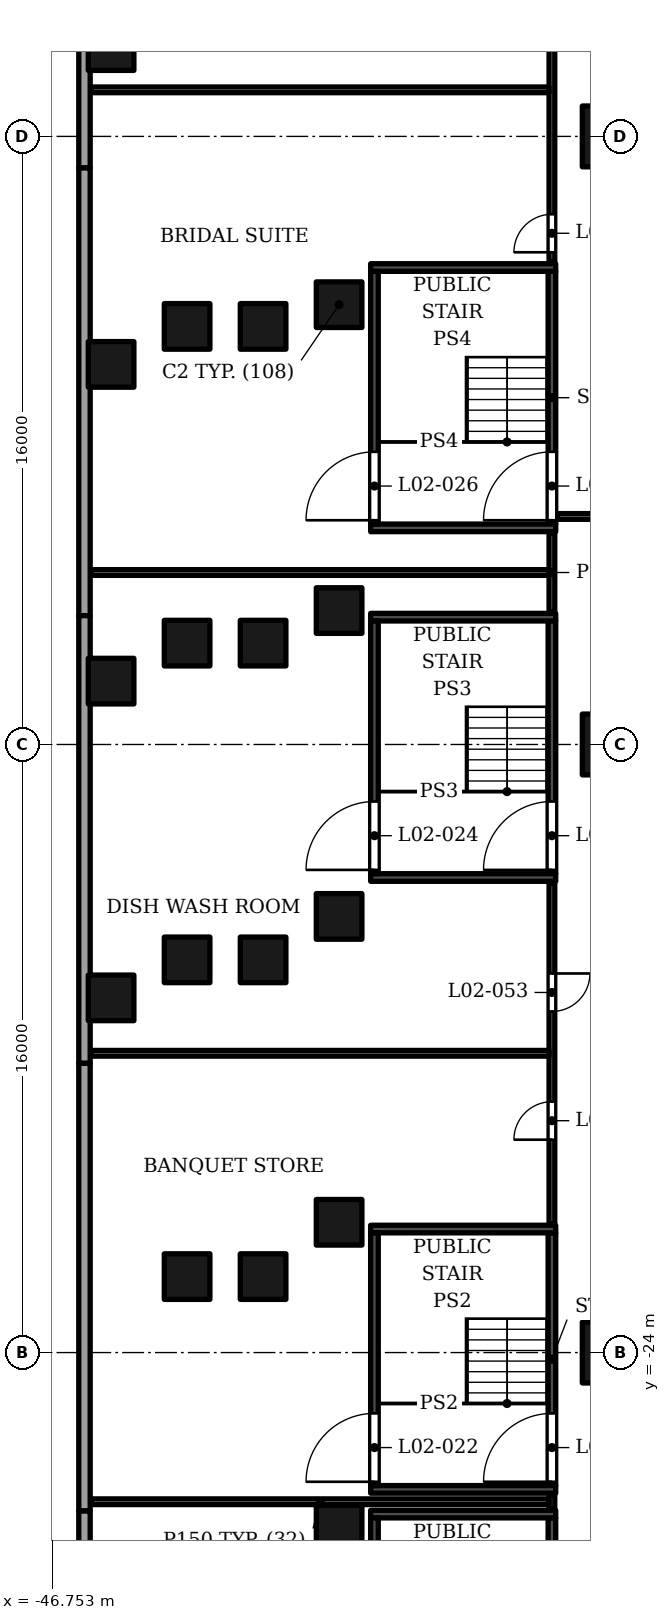
"""IFC4 building model, lengths in metres.
Left out: names, types, materials, properties, quantities, classifications, styles, units other than length and angle.
Written with IfcOpenShell. Run it as: python <this file> out.ifc"""

import sys

from ifc_helpers import new_model, si_unit, direction, frame, frame_2d, origin, origin_2d, place, context, subcontext, project, spatial, rectangle, extrude, element, fill, save


model = new_model("IFC4")
c1 = context("Model", 3, precision=1e-05, world=origin(), true_north=direction((0.0, 1.0)))
c2 = subcontext(c1, "Body", "Model", "MODEL_VIEW")
j1 = project(units=[si_unit("LENGTHUNIT", "METRE"), si_unit("PLANEANGLEUNIT", "RADIAN")], contexts=[c1])
p1 = place(None, origin())
s1 = spatial("IfcSite", under=j1, at=p1, CompositionType="ELEMENT")
p2 = place(p1, origin())
s2 = spatial("IfcBuilding", under=s1, at=p2, CompositionType="ELEMENT")
p3 = place(p2, frame((0.0, 0.0, 20.0)))
s3 = spatial("IfcBuildingStorey", under=s2, at=p3, CompositionType="ELEMENT", Elevation=20.0)
for number, where, z_axis, x_axis in (
    (1, (-32.0, -24.0, 0.0), (0.0, 0.0, 1.0), (1.0, 0.0, 0.0)),
    (2, (-32.0, -8.0, 0.0), (0.0, 0.0, 1.0), (1.0, 0.0, 0.0)),
    (3, (-32.0, 8.0, 0.0), (0.0, 0.0, 1.0), (1.0, 0.0, 0.0)),
):
    element("IfcColumn", number, at=place(p3, frame(where, z_axis=z_axis, x_axis=x_axis)), inside=s3, PredefinedType="COLUMN", context=c2, shape_type="SweptSolid", body=[
        extrude(rectangle(XDim=1.6, YDim=1.6, at=origin_2d()), origin(), (0.0, 0.0, 1.0), 9.0),
    ])
for number, where, z_axis, x_axis in (
    (4, (-39.2, -28.62, 0.0), (0.0, 0.0, 1.0), (1.0, 0.0, 0.0)),
    (5, (-39.2, -20.572, 0.0), (0.0, 0.0, 1.0), (1.0, 0.0, 0.0)),
    (6, (-39.2, -12.524, 0.0), (0.0, 0.0, 1.0), (1.0, 0.0, 0.0)),
    (7, (-39.2, -4.476, 0.0), (0.0, 0.0, 1.0), (1.0, 0.0, 0.0)),
    (8, (-39.2, 3.572, 0.0), (0.0, 0.0, 1.0), (1.0, 0.0, 0.0)),
    (9, (-41.2, -22.001, 0.0), (0.0, 0.0, 1.0), (1.0, 0.0, 0.0)),
    (10, (-41.2, -13.667, 0.0), (0.0, 0.0, 1.0), (1.0, 0.0, 0.0)),
    (11, (-41.2, -5.333, 0.0), (0.0, 0.0, 1.0), (1.0, 0.0, 0.0)),
    (12, (-41.2, 3.001, 0.0), (0.0, 0.0, 1.0), (1.0, 0.0, 0.0)),
    (13, (-43.2, -22.001, 0.0), (0.0, 0.0, 1.0), (1.0, 0.0, 0.0)),
    (14, (-43.2, -13.667, 0.0), (0.0, 0.0, 1.0), (1.0, 0.0, 0.0)),
    (15, (-43.2, -5.333, 0.0), (0.0, 0.0, 1.0), (1.0, 0.0, 0.0)),
    (16, (-43.2, 3.001, 0.0), (0.0, 0.0, 1.0), (1.0, 0.0, 0.0)),
    (17, (-45.2, -14.667, 0.0), (0.0, 0.0, 1.0), (1.0, 0.0, 0.0)),
    (18, (-45.2, -6.333, 0.0), (0.0, 0.0, 1.0), (1.0, 0.0, 0.0)),
    (19, (-45.2, 2.001, 0.0), (0.0, 0.0, 1.0), (1.0, 0.0, 0.0)),
    (20, (-45.2, 10.337, 0.0), (0.0, 0.0, 1.0), (1.0, 0.0, 0.0)),
):
    element("IfcColumn", number, at=place(p3, frame(where, z_axis=z_axis, x_axis=x_axis)), inside=s3, PredefinedType="COLUMN", context=c2, shape_type="SweptSolid", body=[
        extrude(rectangle(XDim=1.2, YDim=1.2, at=origin_2d()), origin(), (0.0, 0.0, 1.0), 9.0),
    ])
for number, where, z_axis, x_axis in (
    (21, (-45.9, 18.95, 0.0), (0.0, 0.0, 1.0), (0.0, -1.0, 0.0)),
    (22, (-45.9, 7.17, 0.0), (0.0, 0.0, 1.0), (0.0, -1.0, 0.0)),
):
    element("IfcWall", number, at=place(p3, frame(where, z_axis=z_axis, x_axis=x_axis)), inside=s3, PredefinedType="SOLIDWALL", context=c2, shape_type="SweptSolid", body=[
        extrude(rectangle(XDim=11.78, YDim=0.3, at=frame_2d((5.89, 0.0))), origin(), (0.0, 0.0, 1.0), 7.6),
    ])
p4 = place(p3, frame((-45.9, -4.61, 0.0), z_axis=(0.0, 0.0, 1.0), x_axis=(0.0, -1.0, 0.0)))
e23 = element("IfcWall", 23, at=p4, inside=s3, PredefinedType="SOLIDWALL", context=c2, shape_type="SweptSolid", body=[
    extrude(rectangle(XDim=11.78, YDim=0.3, at=frame_2d((5.89, 0.0))), origin(), (0.0, 0.0, 1.0), 7.6),
])
for number, where, z_axis, x_axis in (
    (24, (-45.9, -16.39, 0.0), (0.0, 0.0, 1.0), (0.0, -1.0, 0.0)),
    (25, (-45.9, -28.17, 0.0), (0.0, 0.0, 1.0), (0.0, -1.0, 0.0)),
):
    element("IfcWall", number, at=place(p3, frame(where, z_axis=z_axis, x_axis=x_axis)), inside=s3, PredefinedType="SOLIDWALL", context=c2, shape_type="SweptSolid", body=[
        extrude(rectangle(XDim=11.78, YDim=0.3, at=frame_2d((5.89, 0.0))), origin(), (0.0, 0.0, 1.0), 7.6),
    ])
for number, where, z_axis, x_axis in (
    (26, (-45.85, 18.79, 9.0), (0.0, 0.0, 1.0), (0.0, -1.0, 0.0)),
    (27, (-45.85, 4.093, 9.0), (0.0, 0.0, 1.0), (0.0, -1.0, 0.0)),
    (28, (-45.85, -10.605, 9.0), (0.0, 0.0, 1.0), (0.0, -1.0, 0.0)),
    (29, (-45.85, -25.302, 9.0), (0.0, 0.0, 1.0), (0.0, -1.0, 0.0)),
):
    element("IfcWall", number, at=place(p3, frame(where, z_axis=z_axis, x_axis=x_axis)), inside=s3, PredefinedType="PARAPET", context=c2, shape_type="SweptSolid", body=[
        extrude(rectangle(XDim=14.698, YDim=0.3, at=frame_2d((7.349, 0.0))), origin(), (0.0, 0.0, 1.0), 1.1),
    ])
p5 = place(p3, frame((-38.37, -28.25, 0.0), z_axis=(0.0, 0.0, 1.0), x_axis=(1.0, 0.0, 0.0)))
e30 = element("IfcWall", 30, at=p5, inside=s3, PredefinedType="SOLIDWALL", context=c2, shape_type="SweptSolid", body=[
    extrude(rectangle(XDim=4.87, YDim=0.2, at=frame_2d((2.435, 0.0))), origin(), (0.0, 0.0, 1.0), 8.55),
])
p6 = place(p3, frame((-38.27, -35.0, 0.0), z_axis=(0.0, 0.0, 1.0), x_axis=(0.0, 1.0, 0.0)))
e31 = element("IfcWall", 31, at=p6, inside=s3, PredefinedType="SOLIDWALL", context=c2, shape_type="SweptSolid", body=[
    extrude(rectangle(XDim=6.65, YDim=0.2, at=frame_2d((3.325, 0.0))), origin(), (0.0, 0.0, 1.0), 8.55),
])
p7 = place(p6, frame((0.1, 0.0, 0.0)))
e32 = element("IfcOpeningElement", 32, at=p7, cuts=e31, PredefinedType="OPENING", context=c2, shape_type="SweptSolid", body=[
    extrude(rectangle(XDim=1.8, YDim=2.4, at=frame_2d((0.9, 1.2))), frame((0.0, 0.11, 0.0), z_axis=(0.0, -1.0, 0.0), x_axis=(1.0, 0.0, 0.0)), (0.0, 0.0, 1.0), 0.22),
])
p8 = place(p3, frame((-33.6, -35.0, 0.0), z_axis=(0.0, 0.0, 1.0), x_axis=(0.0, 1.0, 0.0)))
e33 = element("IfcWall", 33, at=p8, inside=s3, PredefinedType="SOLIDWALL", context=c2, shape_type="SweptSolid", body=[
    extrude(rectangle(XDim=6.65, YDim=0.2, at=frame_2d((3.325, 0.0))), origin(), (0.0, 0.0, 1.0), 8.55),
])
p9 = place(p8, frame((0.1, 0.0, 0.0)))
e34 = element("IfcOpeningElement", 34, at=p9, cuts=e33, PredefinedType="OPENING", context=c2, shape_type="SweptSolid", body=[
    extrude(rectangle(XDim=1.8, YDim=2.4, at=frame_2d((0.9, 1.2))), frame((0.0, 0.11, 0.0), z_axis=(0.0, -1.0, 0.0), x_axis=(1.0, 0.0, 0.0)), (0.0, 0.0, 1.0), 0.22),
])
for number, where, z_axis, x_axis in (
    (35, (-38.37, -27.6, 0.0), (0.0, 0.0, 1.0), (1.0, 0.0, 0.0)),
    (36, (-38.37, -20.75, 0.0), (0.0, 0.0, 1.0), (1.0, 0.0, 0.0)),
):
    element("IfcWall", number, at=place(p3, frame(where, z_axis=z_axis, x_axis=x_axis)), inside=s3, PredefinedType="SOLIDWALL", context=c2, shape_type="SweptSolid", body=[
        extrude(rectangle(XDim=4.87, YDim=0.2, at=frame_2d((2.435, 0.0))), origin(), (0.0, 0.0, 1.0), 8.55),
    ])
p10 = place(p3, frame((-38.27, -27.5, 0.0), z_axis=(0.0, 0.0, 1.0), x_axis=(0.0, 1.0, 0.0)))
e37 = element("IfcWall", 37, at=p10, inside=s3, PredefinedType="SOLIDWALL", context=c2, shape_type="SweptSolid", body=[
    extrude(rectangle(XDim=6.65, YDim=0.2, at=frame_2d((3.325, 0.0))), origin(), (0.0, 0.0, 1.0), 8.55),
])
p11 = place(p10, frame((0.1, 0.0, 0.0)))
e38 = element("IfcOpeningElement", 38, at=p11, cuts=e37, PredefinedType="OPENING", context=c2, shape_type="SweptSolid", body=[
    extrude(rectangle(XDim=1.8, YDim=2.4, at=frame_2d((0.9, 1.2))), frame((0.0, 0.11, 0.0), z_axis=(0.0, -1.0, 0.0), x_axis=(1.0, 0.0, 0.0)), (0.0, 0.0, 1.0), 0.22),
])
p12 = place(p3, frame((-33.6, -27.5, 0.0), z_axis=(0.0, 0.0, 1.0), x_axis=(0.0, 1.0, 0.0)))
e39 = element("IfcWall", 39, at=p12, inside=s3, PredefinedType="SOLIDWALL", context=c2, shape_type="SweptSolid", body=[
    extrude(rectangle(XDim=6.65, YDim=0.2, at=frame_2d((3.325, 0.0))), origin(), (0.0, 0.0, 1.0), 8.55),
])
p13 = place(p12, frame((0.1, 0.0, 0.0)))
e40 = element("IfcOpeningElement", 40, at=p13, cuts=e39, PredefinedType="OPENING", context=c2, shape_type="SweptSolid", body=[
    extrude(rectangle(XDim=1.8, YDim=2.4, at=frame_2d((0.9, 1.2))), frame((0.0, 0.11, 0.0), z_axis=(0.0, -1.0, 0.0), x_axis=(1.0, 0.0, 0.0)), (0.0, 0.0, 1.0), 0.22),
])
for number, where, z_axis, x_axis in (
    (41, (-38.37, -11.5, 0.0), (0.0, 0.0, 1.0), (1.0, 0.0, 0.0)),
    (42, (-38.37, -4.65, 0.0), (0.0, 0.0, 1.0), (1.0, 0.0, 0.0)),
):
    element("IfcWall", number, at=place(p3, frame(where, z_axis=z_axis, x_axis=x_axis)), inside=s3, PredefinedType="SOLIDWALL", context=c2, shape_type="SweptSolid", body=[
        extrude(rectangle(XDim=4.87, YDim=0.2, at=frame_2d((2.435, 0.0))), origin(), (0.0, 0.0, 1.0), 8.55),
    ])
p14 = place(p3, frame((-38.27, -11.4, 0.0), z_axis=(0.0, 0.0, 1.0), x_axis=(0.0, 1.0, 0.0)))
e43 = element("IfcWall", 43, at=p14, inside=s3, PredefinedType="SOLIDWALL", context=c2, shape_type="SweptSolid", body=[
    extrude(rectangle(XDim=6.65, YDim=0.2, at=frame_2d((3.325, 0.0))), origin(), (0.0, 0.0, 1.0), 8.55),
])
p15 = place(p14, frame((0.1, 0.0, 0.0)))
e44 = element("IfcOpeningElement", 44, at=p15, cuts=e43, PredefinedType="OPENING", context=c2, shape_type="SweptSolid", body=[
    extrude(rectangle(XDim=1.8, YDim=2.4, at=frame_2d((0.9, 1.2))), frame((0.0, 0.11, 0.0), z_axis=(0.0, -1.0, 0.0), x_axis=(1.0, 0.0, 0.0)), (0.0, 0.0, 1.0), 0.22),
])
p16 = place(p3, frame((-33.6, -11.4, 0.0), z_axis=(0.0, 0.0, 1.0), x_axis=(0.0, 1.0, 0.0)))
e45 = element("IfcWall", 45, at=p16, inside=s3, PredefinedType="SOLIDWALL", context=c2, shape_type="SweptSolid", body=[
    extrude(rectangle(XDim=6.65, YDim=0.2, at=frame_2d((3.325, 0.0))), origin(), (0.0, 0.0, 1.0), 8.55),
])
p17 = place(p16, frame((0.1, 0.0, 0.0)))
e46 = element("IfcOpeningElement", 46, at=p17, cuts=e45, PredefinedType="OPENING", context=c2, shape_type="SweptSolid", body=[
    extrude(rectangle(XDim=1.8, YDim=2.4, at=frame_2d((0.9, 1.2))), frame((0.0, 0.11, 0.0), z_axis=(0.0, -1.0, 0.0), x_axis=(1.0, 0.0, 0.0)), (0.0, 0.0, 1.0), 0.22),
])
for number, where, z_axis, x_axis in (
    (47, (-38.37, -2.3, 0.0), (0.0, 0.0, 1.0), (1.0, 0.0, 0.0)),
    (48, (-38.37, 4.55, 0.0), (0.0, 0.0, 1.0), (1.0, 0.0, 0.0)),
):
    element("IfcWall", number, at=place(p3, frame(where, z_axis=z_axis, x_axis=x_axis)), inside=s3, PredefinedType="SOLIDWALL", context=c2, shape_type="SweptSolid", body=[
        extrude(rectangle(XDim=4.87, YDim=0.2, at=frame_2d((2.435, 0.0))), origin(), (0.0, 0.0, 1.0), 8.55),
    ])
p18 = place(p3, frame((-38.27, -2.2, 0.0), z_axis=(0.0, 0.0, 1.0), x_axis=(0.0, 1.0, 0.0)))
e49 = element("IfcWall", 49, at=p18, inside=s3, PredefinedType="SOLIDWALL", context=c2, shape_type="SweptSolid", body=[
    extrude(rectangle(XDim=6.65, YDim=0.2, at=frame_2d((3.325, 0.0))), origin(), (0.0, 0.0, 1.0), 8.55),
])
p19 = place(p18, frame((0.1, 0.0, 0.0)))
e50 = element("IfcOpeningElement", 50, at=p19, cuts=e49, PredefinedType="OPENING", context=c2, shape_type="SweptSolid", body=[
    extrude(rectangle(XDim=1.8, YDim=2.4, at=frame_2d((0.9, 1.2))), frame((0.0, 0.11, 0.0), z_axis=(0.0, -1.0, 0.0), x_axis=(1.0, 0.0, 0.0)), (0.0, 0.0, 1.0), 0.22),
])
p20 = place(p3, frame((-33.6, -2.2, 0.0), z_axis=(0.0, 0.0, 1.0), x_axis=(0.0, 1.0, 0.0)))
e51 = element("IfcWall", 51, at=p20, inside=s3, PredefinedType="SOLIDWALL", context=c2, shape_type="SweptSolid", body=[
    extrude(rectangle(XDim=6.65, YDim=0.2, at=frame_2d((3.325, 0.0))), origin(), (0.0, 0.0, 1.0), 8.55),
])
p21 = place(p20, frame((0.1, 0.0, 0.0)))
e52 = element("IfcOpeningElement", 52, at=p21, cuts=e51, PredefinedType="OPENING", context=c2, shape_type="SweptSolid", body=[
    extrude(rectangle(XDim=1.8, YDim=2.4, at=frame_2d((0.9, 1.2))), frame((0.0, 0.11, 0.0), z_axis=(0.0, -1.0, 0.0), x_axis=(1.0, 0.0, 0.0)), (0.0, 0.0, 1.0), 0.22),
])
p22 = place(p3, frame((-33.6, -28.11, 0.0), z_axis=(0.0, 0.0, 1.0), x_axis=(0.0, 1.0, 0.0)))
e53 = element("IfcWall", 53, at=p22, inside=s3, PredefinedType="PARTITIONING", context=c2, shape_type="SweptSolid", body=[
    extrude(rectangle(XDim=0.37, YDim=0.15, at=frame_2d((0.185, 0.0))), origin(), (0.0, 0.0, 1.0), 8.55),
])
p23 = place(p3, frame((-45.72, -27.925, 0.0), z_axis=(0.0, 0.0, 1.0), x_axis=(1.0, 0.0, 0.0)))
e54 = element("IfcWall", 54, at=p23, inside=s3, PredefinedType="PARTITIONING", context=c2, shape_type="SweptSolid", body=[
    extrude(rectangle(XDim=12.045, YDim=0.15, at=frame_2d((6.022, 0.0))), origin(), (0.0, 0.0, 1.0), 7.65),
])
p24 = place(p3, frame((-33.6, -20.61, 0.0), z_axis=(0.0, 0.0, 1.0), x_axis=(0.0, 1.0, 0.0)))
e55 = element("IfcWall", 55, at=p24, inside=s3, PredefinedType="PARTITIONING", context=c2, shape_type="SweptSolid", body=[
    extrude(rectangle(XDim=8.97, YDim=0.15, at=frame_2d((4.485, 0.0))), origin(), (0.0, 0.0, 1.0), 8.55),
])
p25 = place(p24, frame((2.211, 0.0, 0.0)))
e56 = element("IfcOpeningElement", 56, at=p25, cuts=e55, PredefinedType="OPENING", context=c2, shape_type="SweptSolid", body=[
    extrude(rectangle(XDim=1.0, YDim=2.1, at=frame_2d((0.5, 1.05))), frame((0.0, 0.085, 0.0), z_axis=(0.0, -1.0, 0.0), x_axis=(1.0, 0.0, 0.0)), (0.0, 0.0, 1.0), 0.17),
])
p26 = place(p24, frame((5.585, 0.0, 0.0)))
e57 = element("IfcOpeningElement", 57, at=p26, cuts=e55, PredefinedType="OPENING", context=c2, shape_type="SweptSolid", body=[
    extrude(rectangle(XDim=1.0, YDim=2.1, at=frame_2d((0.5, 1.05))), frame((0.0, 0.085, 0.0), z_axis=(0.0, -1.0, 0.0), x_axis=(1.0, 0.0, 0.0)), (0.0, 0.0, 1.0), 0.17),
])
p27 = place(p3, frame((-45.72, -16.125, 0.0), z_axis=(0.0, 0.0, 1.0), x_axis=(1.0, 0.0, 0.0)))
e58 = element("IfcWall", 58, at=p27, inside=s3, PredefinedType="PARTITIONING", context=c2, shape_type="SweptSolid", body=[
    extrude(rectangle(XDim=12.045, YDim=0.15, at=frame_2d((6.022, 0.0))), origin(), (0.0, 0.0, 1.0), 7.65),
])
p28 = place(p3, frame((-33.6, -4.51, 0.0), z_axis=(0.0, 0.0, 1.0), x_axis=(0.0, 1.0, 0.0)))
e59 = element("IfcWall", 59, at=p28, inside=s3, PredefinedType="PARTITIONING", context=c2, shape_type="SweptSolid", body=[
    extrude(rectangle(XDim=2.07, YDim=0.15, at=frame_2d((1.035, 0.0))), origin(), (0.0, 0.0, 1.0), 8.55),
])
p29 = place(p3, frame((-45.72, -3.475, 0.0), z_axis=(0.0, 0.0, 1.0), x_axis=(1.0, 0.0, 0.0)))
e60 = element("IfcWall", 60, at=p29, inside=s3, PredefinedType="PARTITIONING", context=c2, shape_type="SweptSolid", body=[
    extrude(rectangle(XDim=12.045, YDim=0.15, at=frame_2d((6.022, 0.0))), origin(), (0.0, 0.0, 1.0), 7.65),
])
p30 = place(p3, frame((-33.46, -2.0, 0.0), z_axis=(0.0, 0.0, 1.0), x_axis=(1.0, 0.0, 0.0)))
e61 = element("IfcWall", 61, at=p30, inside=s3, PredefinedType="PARTITIONING", context=c2, shape_type="SweptSolid", body=[
    extrude(rectangle(XDim=66.92, YDim=0.15, at=frame_2d((33.46, 0.0))), origin(), (0.0, 0.0, 1.0), 7.35),
])
p31 = place(p30, frame((15.96, 0.0, 0.0)))
e62 = element("IfcOpeningElement", 62, at=p31, cuts=e61, PredefinedType="OPENING", context=c2, shape_type="SweptSolid", body=[
    extrude(rectangle(XDim=2.4, YDim=2.4, at=frame_2d((1.2, 1.2))), frame((0.0, 0.085, 0.0), z_axis=(0.0, -1.0, 0.0), x_axis=(1.0, 0.0, 0.0)), (0.0, 0.0, 1.0), 0.17),
])
p32 = place(p30, frame((20.71, 0.0, 0.0)))
e63 = element("IfcOpeningElement", 63, at=p32, cuts=e61, PredefinedType="OPENING", context=c2, shape_type="SweptSolid", body=[
    extrude(rectangle(XDim=2.4, YDim=2.4, at=frame_2d((1.2, 1.2))), frame((0.0, 0.085, 0.0), z_axis=(0.0, -1.0, 0.0), x_axis=(1.0, 0.0, 0.0)), (0.0, 0.0, 1.0), 0.17),
])
p33 = place(p30, frame((11.21, 0.0, 0.0)))
e64 = element("IfcOpeningElement", 64, at=p33, cuts=e61, PredefinedType="OPENING", context=c2, shape_type="SweptSolid", body=[
    extrude(rectangle(XDim=2.4, YDim=2.4, at=frame_2d((1.2, 1.2))), frame((0.0, 0.085, 0.0), z_axis=(0.0, -1.0, 0.0), x_axis=(1.0, 0.0, 0.0)), (0.0, 0.0, 1.0), 0.17),
])
p34 = place(p30, frame((49.559, 0.0, 0.0)))
e65 = element("IfcOpeningElement", 65, at=p34, cuts=e61, PredefinedType="OPENING", context=c2, shape_type="SweptSolid", body=[
    extrude(rectangle(XDim=2.4, YDim=2.4, at=frame_2d((1.2, 1.2))), frame((0.0, 0.085, 0.0), z_axis=(0.0, -1.0, 0.0), x_axis=(1.0, 0.0, 0.0)), (0.0, 0.0, 1.0), 0.17),
])
p35 = place(p30, frame((54.309, 0.0, 0.0)))
e66 = element("IfcOpeningElement", 66, at=p35, cuts=e61, PredefinedType="OPENING", context=c2, shape_type="SweptSolid", body=[
    extrude(rectangle(XDim=2.4, YDim=2.4, at=frame_2d((1.2, 1.2))), frame((0.0, 0.085, 0.0), z_axis=(0.0, -1.0, 0.0), x_axis=(1.0, 0.0, 0.0)), (0.0, 0.0, 1.0), 0.17),
])
p36 = place(p30, frame((44.809, 0.0, 0.0)))
e67 = element("IfcOpeningElement", 67, at=p36, cuts=e61, PredefinedType="OPENING", context=c2, shape_type="SweptSolid", body=[
    extrude(rectangle(XDim=2.4, YDim=2.4, at=frame_2d((1.2, 1.2))), frame((0.0, 0.085, 0.0), z_axis=(0.0, -1.0, 0.0), x_axis=(1.0, 0.0, 0.0)), (0.0, 0.0, 1.0), 0.17),
])
p37 = place(p3, frame((-33.6, 4.69, 0.0), z_axis=(0.0, 0.0, 1.0), x_axis=(0.0, 1.0, 0.0)))
e68 = element("IfcWall", 68, at=p37, inside=s3, PredefinedType="PARTITIONING", context=c2, shape_type="SweptSolid", body=[
    extrude(rectangle(XDim=9.07, YDim=0.15, at=frame_2d((4.535, 0.0))), origin(), (0.0, 0.0, 1.0), 7.35),
])
p38 = place(p37, frame((0.261, 0.0, 0.0)))
e69 = element("IfcOpeningElement", 69, at=p38, cuts=e68, PredefinedType="OPENING", context=c2, shape_type="SweptSolid", body=[
    extrude(rectangle(XDim=1.0, YDim=2.1, at=frame_2d((0.5, 1.05))), frame((0.0, 0.085, 0.0), z_axis=(0.0, -1.0, 0.0), x_axis=(1.0, 0.0, 0.0)), (0.0, 0.0, 1.0), 0.17),
])
p39 = place(p37, frame((5.885, 0.0, 0.0)))
e70 = element("IfcOpeningElement", 70, at=p39, cuts=e68, PredefinedType="OPENING", context=c2, shape_type="SweptSolid", body=[
    extrude(rectangle(XDim=1.0, YDim=2.1, at=frame_2d((0.5, 1.05))), frame((0.0, 0.085, 0.0), z_axis=(0.0, -1.0, 0.0), x_axis=(1.0, 0.0, 0.0)), (0.0, 0.0, 1.0), 0.17),
])
p40 = place(p3, frame((-45.72, 9.225, 0.0), z_axis=(0.0, 0.0, 1.0), x_axis=(1.0, 0.0, 0.0)))
e71 = element("IfcWall", 71, at=p40, inside=s3, PredefinedType="PARTITIONING", context=c2, shape_type="SweptSolid", body=[
    extrude(rectangle(XDim=12.045, YDim=0.15, at=frame_2d((6.022, 0.0))), origin(), (0.0, 0.0, 1.0), 7.65),
])
p41 = place(p13, origin())
e72 = element("IfcDoor", 72, at=p41, inside=s3, OperationType="DOUBLE_DOOR_SINGLE_SWING", PredefinedType="DOOR", context=c2, shape_type="SweptSolid", body=[
    extrude(rectangle(XDim=1.8, YDim=2.4, at=frame_2d((0.9, 1.2))), frame((0.0, 0.025, 0.0), z_axis=(0.0, -1.0, 0.0), x_axis=(1.0, 0.0, 0.0)), (0.0, 0.0, 1.0), 0.05),
])
fill(e40, e72)
p42 = place(p11, origin())
e73 = element("IfcDoor", 73, at=p42, inside=s3, OperationType="DOUBLE_DOOR_SINGLE_SWING", PredefinedType="DOOR", context=c2, shape_type="SweptSolid", body=[
    extrude(rectangle(XDim=1.8, YDim=2.4, at=frame_2d((0.9, 1.2))), frame((0.0, 0.025, 0.0), z_axis=(0.0, -1.0, 0.0), x_axis=(1.0, 0.0, 0.0)), (0.0, 0.0, 1.0), 0.05),
])
fill(e38, e73)
p43 = place(p17, origin())
e74 = element("IfcDoor", 74, at=p43, inside=s3, OperationType="DOUBLE_DOOR_SINGLE_SWING", PredefinedType="DOOR", context=c2, shape_type="SweptSolid", body=[
    extrude(rectangle(XDim=1.8, YDim=2.4, at=frame_2d((0.9, 1.2))), frame((0.0, 0.025, 0.0), z_axis=(0.0, -1.0, 0.0), x_axis=(1.0, 0.0, 0.0)), (0.0, 0.0, 1.0), 0.05),
])
fill(e46, e74)
p44 = place(p15, origin())
e75 = element("IfcDoor", 75, at=p44, inside=s3, OperationType="DOUBLE_DOOR_SINGLE_SWING", PredefinedType="DOOR", context=c2, shape_type="SweptSolid", body=[
    extrude(rectangle(XDim=1.8, YDim=2.4, at=frame_2d((0.9, 1.2))), frame((0.0, 0.025, 0.0), z_axis=(0.0, -1.0, 0.0), x_axis=(1.0, 0.0, 0.0)), (0.0, 0.0, 1.0), 0.05),
])
fill(e44, e75)
p45 = place(p21, origin())
e76 = element("IfcDoor", 76, at=p45, inside=s3, OperationType="DOUBLE_DOOR_SINGLE_SWING", PredefinedType="DOOR", context=c2, shape_type="SweptSolid", body=[
    extrude(rectangle(XDim=1.8, YDim=2.4, at=frame_2d((0.9, 1.2))), frame((0.0, 0.025, 0.0), z_axis=(0.0, -1.0, 0.0), x_axis=(1.0, 0.0, 0.0)), (0.0, 0.0, 1.0), 0.05),
])
fill(e52, e76)
p46 = place(p19, origin())
e77 = element("IfcDoor", 77, at=p46, inside=s3, OperationType="DOUBLE_DOOR_SINGLE_SWING", PredefinedType="DOOR", context=c2, shape_type="SweptSolid", body=[
    extrude(rectangle(XDim=1.8, YDim=2.4, at=frame_2d((0.9, 1.2))), frame((0.0, 0.025, 0.0), z_axis=(0.0, -1.0, 0.0), x_axis=(1.0, 0.0, 0.0)), (0.0, 0.0, 1.0), 0.05),
])
fill(e50, e77)
p47 = place(p25, origin())
e78 = element("IfcDoor", 78, at=p47, inside=s3, OperationType="SINGLE_SWING_LEFT", PredefinedType="DOOR", context=c2, shape_type="SweptSolid", body=[
    extrude(rectangle(XDim=1.0, YDim=2.1, at=frame_2d((0.5, 1.05))), frame((0.0, 0.025, 0.0), z_axis=(0.0, -1.0, 0.0), x_axis=(1.0, 0.0, 0.0)), (0.0, 0.0, 1.0), 0.05),
])
fill(e56, e78)
p48 = place(p26, origin())
e79 = element("IfcDoor", 79, at=p48, inside=s3, OperationType="SINGLE_SWING_RIGHT", PredefinedType="DOOR", context=c2, shape_type="SweptSolid", body=[
    extrude(rectangle(XDim=1.0, YDim=2.1, at=frame_2d((0.5, 1.05))), frame((0.0, 0.025, 0.0), z_axis=(0.0, -1.0, 0.0), x_axis=(1.0, 0.0, 0.0)), (0.0, 0.0, 1.0), 0.05),
])
fill(e57, e79)
p49 = place(p38, origin())
e80 = element("IfcDoor", 80, at=p49, inside=s3, OperationType="SINGLE_SWING_LEFT", PredefinedType="DOOR", context=c2, shape_type="SweptSolid", body=[
    extrude(rectangle(XDim=1.0, YDim=2.1, at=frame_2d((0.5, 1.05))), frame((0.0, 0.025, 0.0), z_axis=(0.0, -1.0, 0.0), x_axis=(1.0, 0.0, 0.0)), (0.0, 0.0, 1.0), 0.05),
])
fill(e69, e80)
save(model, sys.argv[1])
